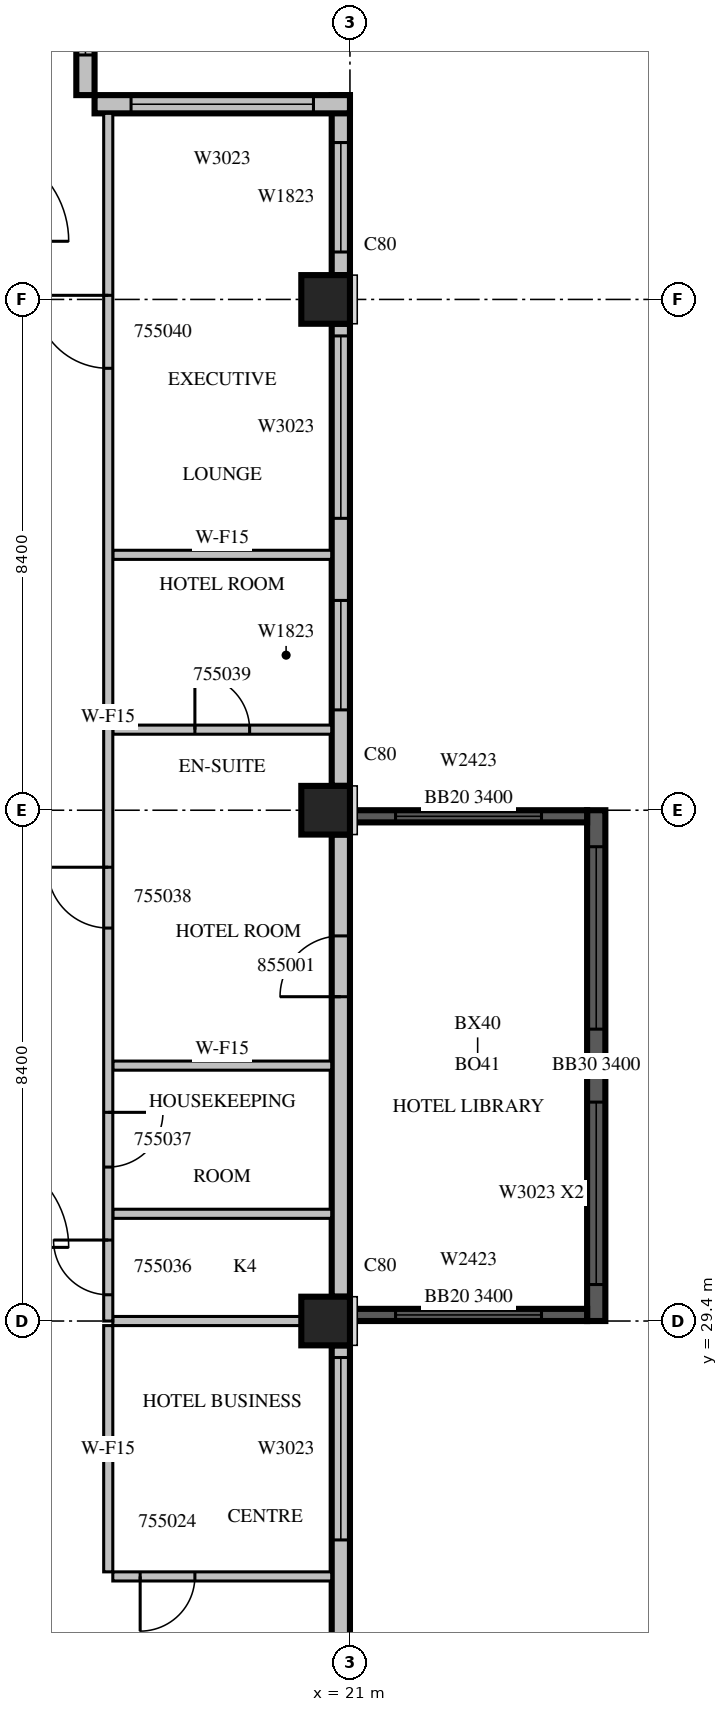
"""IFC4 building model, lengths in metres.
Left out: names, types, materials, properties, quantities, classifications, styles, units other than length and angle.
Written with IfcOpenShell. Run it as: python <this file> out.ifc"""

import sys

from ifc_helpers import new_model, si_unit, direction, frame, frame_2d, origin, origin_2d, place, context, subcontext, project, spatial, rectangle, extrude, source, transform, mapped, element, fill, save


model = new_model("IFC4")
c1 = context("Model", 3, precision=1e-05, world=origin(), true_north=direction((0.0, 1.0)))
c2 = subcontext(c1, "Body", "Model", "MODEL_VIEW")
j1 = project(units=[si_unit("LENGTHUNIT", "METRE"), si_unit("PLANEANGLEUNIT", "RADIAN")], contexts=[c1])
p1 = place(None, origin())
s1 = spatial("IfcSite", under=j1, at=p1, CompositionType="ELEMENT")
p2 = place(p1, origin())
s2 = spatial("IfcBuilding", under=s1, at=p2, CompositionType="ELEMENT")
p3 = place(p2, frame((0.0, 0.0, 242.4)))
s3 = spatial("IfcBuildingStorey", under=s2, at=p3, CompositionType="ELEMENT", Elevation=242.4)
m1 = source(origin(), c2, "Body", "SweptSolid", [
    extrude(rectangle(XDim=0.8, YDim=0.8, at=origin_2d()), origin(), (0.0, 0.0, 1.0), 3.8),
])
for number, where, z_axis, x_axis in (
    (1, (20.6, 29.4, 0.0), (0.0, 0.0, 1.0), (1.0, 0.0, 0.0)),
    (2, (20.6, 37.8, 0.0), (0.0, 0.0, 1.0), (1.0, 0.0, 0.0)),
    (3, (20.6, 46.2, 0.0), (0.0, 0.0, 1.0), (1.0, 0.0, 0.0)),
):
    element("IfcColumn", number, at=place(p3, frame(where, z_axis=z_axis, x_axis=x_axis)), inside=s3, PredefinedType="COLUMN", context=c2, shape_type="MappedRepresentation", body=[
        mapped(m1, transform((0.0, 0.0, 0.0), scale=1.0)),
    ])
m2 = source(origin(), c2, "Body", "SweptSolid", [
    extrude(rectangle(XDim=8.4, YDim=0.3, at=frame_2d((4.2, 0.0))), origin(), (0.0, 0.0, 1.0), 3.4),
])
p4 = place(p3, frame((25.05, 29.4, 0.0), z_axis=(0.0, 0.0, 1.0), x_axis=(0.0, 1.0, 0.0)))
e4 = element("IfcWall", 4, at=p4, inside=s3, PredefinedType="SOLIDWALL", context=c2, shape_type="MappedRepresentation", body=[
    mapped(m2, transform((0.0, 0.0, 0.0), scale=1.0)),
])
m3 = source(origin(), c2, "Body", "SweptSolid", [
    extrude(rectangle(XDim=3.0, YDim=2.3, at=frame_2d((1.5, 1.15))), frame((0.0, 0.16, 0.0), z_axis=(0.0, -1.0, 0.0), x_axis=(1.0, 0.0, 0.0)), (0.0, 0.0, 1.0), 0.32),
])
p5 = place(p4, frame((0.6, 0.0, 0.6)))
e5 = element("IfcOpeningElement", 5, at=p5, cuts=e4, PredefinedType="OPENING", context=c2, shape_type="MappedRepresentation", body=[
    mapped(m3, transform((0.0, 0.0, 0.0), scale=1.0)),
])
p6 = place(p4, frame((4.8, 0.0, 0.6)))
e6 = element("IfcOpeningElement", 6, at=p6, cuts=e4, PredefinedType="OPENING", context=c2, shape_type="MappedRepresentation", body=[
    mapped(m3, transform((0.0, 0.0, 0.0), scale=1.0)),
])
m4 = source(origin(), c2, "Body", "SweptSolid", [
    extrude(rectangle(XDim=3.9, YDim=0.2, at=frame_2d((1.95, 0.0))), origin(), (0.0, 0.0, 1.0), 3.4),
])
p7 = place(p3, frame((21.0, 29.5, 0.0), z_axis=(0.0, 0.0, 1.0), x_axis=(1.0, 0.0, 0.0)))
e7 = element("IfcWall", 7, at=p7, inside=s3, PredefinedType="SOLIDWALL", context=c2, shape_type="MappedRepresentation", body=[
    mapped(m4, transform((0.0, 0.0, 0.0), scale=1.0)),
])
m5 = source(origin(), c2, "Body", "SweptSolid", [
    extrude(rectangle(XDim=2.4, YDim=2.3, at=frame_2d((1.2, 1.15))), frame((0.0, 0.11, 0.0), z_axis=(0.0, -1.0, 0.0), x_axis=(1.0, 0.0, 0.0)), (0.0, 0.0, 1.0), 0.22),
])
p8 = place(p7, frame((0.75, 0.0, 0.6)))
e8 = element("IfcOpeningElement", 8, at=p8, cuts=e7, PredefinedType="OPENING", context=c2, shape_type="MappedRepresentation", body=[
    mapped(m5, transform((0.0, 0.0, 0.0), scale=1.0)),
])
p9 = place(p3, frame((21.0, 37.7, 0.0), z_axis=(0.0, 0.0, 1.0), x_axis=(1.0, 0.0, 0.0)))
e9 = element("IfcWall", 9, at=p9, inside=s3, PredefinedType="SOLIDWALL", context=c2, shape_type="MappedRepresentation", body=[
    mapped(m4, transform((0.0, 0.0, 0.0), scale=1.0)),
])
p10 = place(p9, frame((0.75, 0.0, 0.6)))
e10 = element("IfcOpeningElement", 10, at=p10, cuts=e9, PredefinedType="OPENING", context=c2, shape_type="MappedRepresentation", body=[
    mapped(m5, transform((0.0, 0.0, 0.0), scale=1.0)),
])
m6 = source(origin(), c2, "Body", "SweptSolid", [
    extrude(rectangle(XDim=7.2, YDim=0.3, at=frame_2d((3.6, 0.0))), origin(), (0.0, 0.0, 1.0), 3.4),
])
p11 = place(p3, frame((20.85, 21.8, 0.0), z_axis=(0.0, 0.0, 1.0), x_axis=(0.0, 1.0, 0.0)))
e11 = element("IfcWall", 11, at=p11, inside=s3, PredefinedType="STANDARD", context=c2, shape_type="MappedRepresentation", body=[
    mapped(m6, transform((0.0, 0.0, 0.0), scale=1.0)),
])
m7 = source(origin(), c2, "Body", "SweptSolid", [
    extrude(rectangle(XDim=1.8, YDim=2.3, at=frame_2d((0.9, 1.15))), frame((0.0, 0.16, 0.0), z_axis=(0.0, -1.0, 0.0), x_axis=(1.0, 0.0, 0.0)), (0.0, 0.0, 1.0), 0.32),
])
p12 = place(p11, frame((0.4, 0.0, 0.6)))
e12 = element("IfcOpeningElement", 12, at=p12, cuts=e11, PredefinedType="OPENING", context=c2, shape_type="MappedRepresentation", body=[
    mapped(m7, transform((0.0, 0.0, 0.0), scale=1.0)),
])
p13 = place(p11, frame((4.0, 0.0, 0.6)))
e13 = element("IfcOpeningElement", 13, at=p13, cuts=e11, PredefinedType="OPENING", context=c2, shape_type="MappedRepresentation", body=[
    mapped(m3, transform((0.0, 0.0, 0.0), scale=1.0)),
])
m8 = source(origin(), c2, "Body", "SweptSolid", [
    extrude(rectangle(XDim=7.6, YDim=0.3, at=frame_2d((3.8, 0.0))), origin(), (0.0, 0.0, 1.0), 3.4),
])
p14 = place(p3, frame((20.85, 29.8, 0.0), z_axis=(0.0, 0.0, 1.0), x_axis=(0.0, 1.0, 0.0)))
e14 = element("IfcWall", 14, at=p14, inside=s3, PredefinedType="STANDARD", context=c2, shape_type="MappedRepresentation", body=[
    mapped(m8, transform((0.0, 0.0, 0.0), scale=1.0)),
])
m9 = source(origin(), c2, "Body", "SweptSolid", [
    extrude(rectangle(XDim=1.0, YDim=2.1, at=frame_2d((0.5, 1.05))), frame((0.0, 0.16, 0.0), z_axis=(0.0, -1.0, 0.0), x_axis=(1.0, 0.0, 0.0)), (0.0, 0.0, 1.0), 0.32),
])
p15 = place(p14, frame((4.933, 0.0, 0.0)))
e15 = element("IfcOpeningElement", 15, at=p15, cuts=e14, PredefinedType="OPENING", context=c2, shape_type="MappedRepresentation", body=[
    mapped(m9, transform((0.0, 0.0, 0.0), scale=1.0)),
])
p16 = place(p3, frame((20.85, 38.2, 0.0), z_axis=(0.0, 0.0, 1.0), x_axis=(0.0, 1.0, 0.0)))
e16 = element("IfcWall", 16, at=p16, inside=s3, PredefinedType="STANDARD", context=c2, shape_type="MappedRepresentation", body=[
    mapped(m8, transform((0.0, 0.0, 0.0), scale=1.0)),
])
p17 = place(p16, frame((1.25, 0.0, 0.6)))
e17 = element("IfcOpeningElement", 17, at=p17, cuts=e16, PredefinedType="OPENING", context=c2, shape_type="MappedRepresentation", body=[
    mapped(m7, transform((0.0, 0.0, 0.0), scale=1.0)),
])
p18 = place(p16, frame((4.4, 0.0, 0.6)))
e18 = element("IfcOpeningElement", 18, at=p18, cuts=e16, PredefinedType="OPENING", context=c2, shape_type="MappedRepresentation", body=[
    mapped(m3, transform((0.0, 0.0, 0.0), scale=1.0)),
])
m10 = source(origin(), c2, "Body", "SweptSolid", [
    extrude(rectangle(XDim=2.96, YDim=0.3, at=frame_2d((1.48, 0.0))), origin(), (0.0, 0.0, 1.0), 3.4),
])
p19 = place(p3, frame((20.85, 46.6, 0.0), z_axis=(0.0, 0.0, 1.0), x_axis=(0.0, 1.0, 0.0)))
e19 = element("IfcWall", 19, at=p19, inside=s3, PredefinedType="STANDARD", context=c2, shape_type="MappedRepresentation", body=[
    mapped(m10, transform((0.0, 0.0, 0.0), scale=1.0)),
])
p20 = place(p19, frame((0.38, 0.0, 0.6)))
e20 = element("IfcOpeningElement", 20, at=p20, cuts=e19, PredefinedType="OPENING", context=c2, shape_type="MappedRepresentation", body=[
    mapped(m7, transform((0.0, 0.0, 0.0), scale=1.0)),
])
m11 = source(origin(), c2, "Body", "SweptSolid", [
    extrude(rectangle(XDim=4.2, YDim=0.3, at=frame_2d((2.1, 0.0))), origin(), (0.0, 0.0, 1.0), 3.4),
])
p21 = place(p3, frame((21.0, 49.41, 0.0), z_axis=(0.0, 0.0, 1.0), x_axis=(-1.0, 0.0, 0.0)))
e21 = element("IfcWall", 21, at=p21, inside=s3, PredefinedType="STANDARD", context=c2, shape_type="MappedRepresentation", body=[
    mapped(m11, transform((0.0, 0.0, 0.0), scale=1.0)),
])
p22 = place(p21, frame((0.6, 0.0, 0.6)))
e22 = element("IfcOpeningElement", 22, at=p22, cuts=e21, PredefinedType="OPENING", context=c2, shape_type="MappedRepresentation", body=[
    mapped(m3, transform((0.0, 0.0, 0.0), scale=1.0)),
])
m12 = source(origin(), c2, "Body", "SweptSolid", [
    extrude(rectangle(XDim=2.52, YDim=0.3, at=frame_2d((1.26, 0.0))), origin(), (0.0, 0.0, 1.0), 3.4),
])
p23 = place(p3, frame((16.65, 49.56, 0.0), z_axis=(0.0, 0.0, 1.0), x_axis=(0.0, 1.0, 0.0)))
e23 = element("IfcWall", 23, at=p23, inside=s3, PredefinedType="STANDARD", context=c2, shape_type="MappedRepresentation", body=[
    mapped(m12, transform((0.0, 0.0, 0.0), scale=1.0)),
])
m13 = source(origin(), c2, "Body", "SweptSolid", [
    extrude(rectangle(XDim=1.2, YDim=2.3, at=frame_2d((0.6, 1.15))), frame((0.0, 0.16, 0.0), z_axis=(0.0, -1.0, 0.0), x_axis=(1.0, 0.0, 0.0)), (0.0, 0.0, 1.0), 0.32),
])
p24 = place(p23, frame((0.66, 0.0, 0.6)))
e24 = element("IfcOpeningElement", 24, at=p24, cuts=e23, PredefinedType="OPENING", context=c2, shape_type="MappedRepresentation", body=[
    mapped(m13, transform((0.0, 0.0, 0.0), scale=1.0)),
])
m14 = source(origin(), c2, "Body", "SweptSolid", [
    extrude(rectangle(XDim=3.6, YDim=0.15, at=frame_2d((1.8, 0.0))), origin(), (0.0, 0.0, 1.0), 3.4),
])
p25 = place(p3, frame((17.1, 25.2, 0.0), z_axis=(0.0, 0.0, 1.0), x_axis=(1.0, 0.0, 0.0)))
e25 = element("IfcWall", 25, at=p25, inside=s3, PredefinedType="PARTITIONING", context=c2, shape_type="MappedRepresentation", body=[
    mapped(m14, transform((0.0, 0.0, 0.0), scale=1.0)),
])
m15 = source(origin(), c2, "Body", "SweptSolid", [
    extrude(rectangle(XDim=0.9, YDim=2.1, at=frame_2d((0.45, 1.05))), frame((0.0, 0.085, 0.0), z_axis=(0.0, -1.0, 0.0), x_axis=(1.0, 0.0, 0.0)), (0.0, 0.0, 1.0), 0.17),
])
p26 = place(p25, frame((0.45, 0.0, 0.0)))
e26 = element("IfcOpeningElement", 26, at=p26, cuts=e25, PredefinedType="OPENING", context=c2, shape_type="MappedRepresentation", body=[
    mapped(m15, transform((0.0, 0.0, 0.0), scale=1.0)),
])
m16 = source(origin(), c2, "Body", "SweptSolid", [
    extrude(rectangle(XDim=4.05, YDim=0.15, at=frame_2d((2.025, 0.0))), origin(), (0.0, 0.0, 1.0), 3.4),
])
p27 = place(p3, frame((17.025, 29.325, 0.0), z_axis=(0.0, 0.0, 1.0), x_axis=(0.0, -1.0, 0.0)))
e27 = element("IfcWall", 27, at=p27, inside=s3, PredefinedType="PARTITIONING", context=c2, shape_type="MappedRepresentation", body=[
    mapped(m16, transform((0.0, 0.0, 0.0), scale=1.0)),
])
m17 = source(origin(), c2, "Body", "SweptSolid", [
    extrude(rectangle(XDim=3.101, YDim=0.15, at=frame_2d((1.55, 0.0))), origin(), (0.0, 0.0, 1.0), 3.4),
])
p28 = place(p3, frame((20.201, 29.4, 0.0), z_axis=(0.0, 0.0, 1.0), x_axis=(-1.0, 0.0, 0.0)))
e28 = element("IfcWall", 28, at=p28, inside=s3, PredefinedType="PARTITIONING", context=c2, shape_type="MappedRepresentation", body=[
    mapped(m17, transform((0.0, 0.0, 0.0), scale=1.0)),
])
p29 = place(p3, frame((17.1, 31.163, 0.0), z_axis=(0.0, 0.0, 1.0), x_axis=(1.0, 0.0, 0.0)))
e29 = element("IfcWall", 29, at=p29, inside=s3, PredefinedType="PARTITIONING", context=c2, shape_type="MappedRepresentation", body=[
    mapped(m14, transform((0.0, 0.0, 0.0), scale=1.0)),
])
p30 = place(p3, frame((17.1, 39.125, 0.0), z_axis=(0.0, 0.0, 1.0), x_axis=(1.0, 0.0, 0.0)))
e30 = element("IfcWall", 30, at=p30, inside=s3, PredefinedType="PARTITIONING", context=c2, shape_type="MappedRepresentation", body=[
    mapped(m14, transform((0.0, 0.0, 0.0), scale=1.0)),
])
p31 = place(p30, frame((1.35, 0.0, 0.0)))
e31 = element("IfcOpeningElement", 31, at=p31, cuts=e30, PredefinedType="OPENING", context=c2, shape_type="MappedRepresentation", body=[
    mapped(m15, transform((0.0, 0.0, 0.0), scale=1.0)),
])
for number, where, z_axis, x_axis in (
    (32, (20.7, 33.6, 0.0), (0.0, 0.0, 1.0), (-1.0, 0.0, 0.0)),
    (33, (20.7, 42.0, 0.0), (0.0, 0.0, 1.0), (-1.0, 0.0, 0.0)),
):
    element("IfcWall", number, at=place(p3, frame(where, z_axis=z_axis, x_axis=x_axis)), inside=s3, PredefinedType="PARTITIONING", context=c2, shape_type="MappedRepresentation", body=[
        mapped(m14, transform((0.0, 0.0, 0.0), scale=1.0)),
    ])
m18 = source(origin(), c2, "Body", "SweptSolid", [
    extrude(rectangle(XDim=19.86, YDim=0.15, at=frame_2d((9.93, 0.0))), origin(), (0.0, 0.0, 1.0), 3.4),
])
p32 = place(p3, frame((17.025, 49.26, 0.0), z_axis=(0.0, 0.0, 1.0), x_axis=(0.0, -1.0, 0.0)))
e34 = element("IfcWall", 34, at=p32, inside=s3, PredefinedType="PARTITIONING", context=c2, shape_type="MappedRepresentation", body=[
    mapped(m18, transform((0.0, 0.0, 0.0), scale=1.0)),
])
p33 = place(p32, frame((18.528, 0.0, 0.0)))
e35 = element("IfcOpeningElement", 35, at=p33, cuts=e34, PredefinedType="OPENING", context=c2, shape_type="MappedRepresentation", body=[
    mapped(m15, transform((0.0, 0.0, 0.0), scale=1.0)),
])
p34 = place(p32, frame((16.428, 0.0, 0.0)))
e36 = element("IfcOpeningElement", 36, at=p34, cuts=e34, PredefinedType="OPENING", context=c2, shape_type="MappedRepresentation", body=[
    mapped(m15, transform((0.0, 0.0, 0.0), scale=1.0)),
])
m19 = source(origin(), c2, "Body", "SweptSolid", [
    extrude(rectangle(XDim=1.0, YDim=2.1, at=frame_2d((0.5, 1.05))), frame((0.0, 0.085, 0.0), z_axis=(0.0, -1.0, 0.0), x_axis=(1.0, 0.0, 0.0)), (0.0, 0.0, 1.0), 0.17),
])
p35 = place(p32, frame((12.398, 0.0, 0.0)))
e37 = element("IfcOpeningElement", 37, at=p35, cuts=e34, PredefinedType="OPENING", context=c2, shape_type="MappedRepresentation", body=[
    mapped(m19, transform((0.0, 0.0, 0.0), scale=1.0)),
])
m20 = source(origin(), c2, "Body", "SweptSolid", [
    extrude(rectangle(XDim=1.2, YDim=2.1, at=frame_2d((0.6, 1.05))), frame((0.0, 0.085, 0.0), z_axis=(0.0, -1.0, 0.0), x_axis=(1.0, 0.0, 0.0)), (0.0, 0.0, 1.0), 0.17),
])
p36 = place(p32, frame((2.993, 0.0, 0.0)))
e38 = element("IfcOpeningElement", 38, at=p36, cuts=e34, PredefinedType="OPENING", context=c2, shape_type="MappedRepresentation", body=[
    mapped(m20, transform((0.0, 0.0, 0.0), scale=1.0)),
])
m21 = source(origin(), c2, "Body", "SweptSolid", [
    extrude(rectangle(XDim=3.0, YDim=2.3, at=frame_2d((1.5, 1.15))), frame((0.0, 0.03, 0.0), z_axis=(0.0, -1.0, 0.0), x_axis=(1.0, 0.0, 0.0)), (0.0, 0.0, 1.0), 0.06),
])
p37 = place(p5, origin())
e39 = element("IfcWindow", 39, at=p37, inside=s3, PartitioningType="SINGLE_PANEL", PredefinedType="WINDOW", context=c2, shape_type="MappedRepresentation", body=[
    mapped(m21, transform((0.0, 0.0, 0.0), scale=1.0)),
])
fill(e5, e39)
p38 = place(p6, origin())
e40 = element("IfcWindow", 40, at=p38, inside=s3, PartitioningType="SINGLE_PANEL", PredefinedType="WINDOW", context=c2, shape_type="MappedRepresentation", body=[
    mapped(m21, transform((0.0, 0.0, 0.0), scale=1.0)),
])
fill(e6, e40)
m22 = source(origin(), c2, "Body", "SweptSolid", [
    extrude(rectangle(XDim=2.4, YDim=2.3, at=frame_2d((1.2, 1.15))), frame((0.0, 0.03, 0.0), z_axis=(0.0, -1.0, 0.0), x_axis=(1.0, 0.0, 0.0)), (0.0, 0.0, 1.0), 0.06),
])
p39 = place(p8, origin())
e41 = element("IfcWindow", 41, at=p39, inside=s3, PartitioningType="SINGLE_PANEL", PredefinedType="WINDOW", context=c2, shape_type="MappedRepresentation", body=[
    mapped(m22, transform((0.0, 0.0, 0.0), scale=1.0)),
])
fill(e8, e41)
p40 = place(p10, origin())
e42 = element("IfcWindow", 42, at=p40, inside=s3, PartitioningType="SINGLE_PANEL", PredefinedType="WINDOW", context=c2, shape_type="MappedRepresentation", body=[
    mapped(m22, transform((0.0, 0.0, 0.0), scale=1.0)),
])
fill(e10, e42)
p41 = place(p13, origin())
e43 = element("IfcWindow", 43, at=p41, inside=s3, PartitioningType="SINGLE_PANEL", PredefinedType="WINDOW", context=c2, shape_type="MappedRepresentation", body=[
    mapped(m21, transform((0.0, 0.0, 0.0), scale=1.0)),
])
fill(e13, e43)
m23 = source(origin(), c2, "Body", "SweptSolid", [
    extrude(rectangle(XDim=1.8, YDim=2.3, at=frame_2d((0.9, 1.15))), frame((0.0, 0.03, 0.0), z_axis=(0.0, -1.0, 0.0), x_axis=(1.0, 0.0, 0.0)), (0.0, 0.0, 1.0), 0.06),
])
p42 = place(p17, origin())
e44 = element("IfcWindow", 44, at=p42, inside=s3, PartitioningType="SINGLE_PANEL", PredefinedType="WINDOW", context=c2, shape_type="MappedRepresentation", body=[
    mapped(m23, transform((0.0, 0.0, 0.0), scale=1.0)),
])
fill(e17, e44)
p43 = place(p18, origin())
e45 = element("IfcWindow", 45, at=p43, inside=s3, PartitioningType="SINGLE_PANEL", PredefinedType="WINDOW", context=c2, shape_type="MappedRepresentation", body=[
    mapped(m21, transform((0.0, 0.0, 0.0), scale=1.0)),
])
fill(e18, e45)
p44 = place(p20, origin())
e46 = element("IfcWindow", 46, at=p44, inside=s3, PartitioningType="SINGLE_PANEL", PredefinedType="WINDOW", context=c2, shape_type="MappedRepresentation", body=[
    mapped(m23, transform((0.0, 0.0, 0.0), scale=1.0)),
])
fill(e20, e46)
p45 = place(p22, origin())
e47 = element("IfcWindow", 47, at=p45, inside=s3, PartitioningType="SINGLE_PANEL", PredefinedType="WINDOW", context=c2, shape_type="MappedRepresentation", body=[
    mapped(m21, transform((0.0, 0.0, 0.0), scale=1.0)),
])
fill(e22, e47)
m24 = source(origin(), c2, "Body", "SweptSolid", [
    extrude(rectangle(XDim=1.2, YDim=2.3, at=frame_2d((0.6, 1.15))), frame((0.0, 0.03, 0.0), z_axis=(0.0, -1.0, 0.0), x_axis=(1.0, 0.0, 0.0)), (0.0, 0.0, 1.0), 0.06),
])
p46 = place(p24, origin())
e48 = element("IfcWindow", 48, at=p46, inside=s3, PartitioningType="SINGLE_PANEL", PredefinedType="WINDOW", context=c2, shape_type="MappedRepresentation", body=[
    mapped(m24, transform((0.0, 0.0, 0.0), scale=1.0)),
])
fill(e24, e48)
m25 = source(origin(), c2, "Body", "SweptSolid", [
    extrude(rectangle(XDim=0.9, YDim=2.1, at=frame_2d((0.45, 1.05))), frame((0.0, 0.025, 0.0), z_axis=(0.0, -1.0, 0.0), x_axis=(1.0, 0.0, 0.0)), (0.0, 0.0, 1.0), 0.05),
])
p47 = place(p26, origin())
e49 = element("IfcDoor", 49, at=p47, inside=s3, OperationType="SINGLE_SWING_RIGHT", PredefinedType="DOOR", context=c2, shape_type="MappedRepresentation", body=[
    mapped(m25, transform((0.0, 0.0, 0.0), scale=1.0)),
])
fill(e26, e49)
p48 = place(p33, origin())
e50 = element("IfcDoor", 50, at=p48, inside=s3, OperationType="SINGLE_SWING_RIGHT", PredefinedType="DOOR", context=c2, shape_type="MappedRepresentation", body=[
    mapped(m25, transform((0.0, 0.0, 0.0), scale=1.0)),
])
fill(e35, e50)
p49 = place(p34, origin())
e51 = element("IfcDoor", 51, at=p49, inside=s3, OperationType="SINGLE_SWING_LEFT", PredefinedType="DOOR", context=c2, shape_type="MappedRepresentation", body=[
    mapped(m25, transform((0.0, 0.0, 0.0), scale=1.0)),
])
fill(e36, e51)
m26 = source(origin(), c2, "Body", "SweptSolid", [
    extrude(rectangle(XDim=1.0, YDim=2.1, at=frame_2d((0.5, 1.05))), frame((0.0, 0.025, 0.0), z_axis=(0.0, -1.0, 0.0), x_axis=(1.0, 0.0, 0.0)), (0.0, 0.0, 1.0), 0.05),
])
p50 = place(p35, origin())
e52 = element("IfcDoor", 52, at=p50, inside=s3, OperationType="SINGLE_SWING_RIGHT", PredefinedType="DOOR", context=c2, shape_type="MappedRepresentation", body=[
    mapped(m26, transform((0.0, 0.0, 0.0), scale=1.0)),
])
fill(e37, e52)
p51 = place(p31, origin())
e53 = element("IfcDoor", 53, at=p51, inside=s3, OperationType="SINGLE_SWING_LEFT", PredefinedType="DOOR", context=c2, shape_type="MappedRepresentation", body=[
    mapped(m25, transform((0.0, 0.0, 0.0), scale=1.0)),
])
fill(e31, e53)
m27 = source(origin(), c2, "Body", "SweptSolid", [
    extrude(rectangle(XDim=1.2, YDim=2.1, at=frame_2d((0.6, 1.05))), frame((0.0, 0.025, 0.0), z_axis=(0.0, -1.0, 0.0), x_axis=(1.0, 0.0, 0.0)), (0.0, 0.0, 1.0), 0.05),
])
p52 = place(p36, origin())
e54 = element("IfcDoor", 54, at=p52, inside=s3, OperationType="SINGLE_SWING_RIGHT", PredefinedType="DOOR", context=c2, shape_type="MappedRepresentation", body=[
    mapped(m27, transform((0.0, 0.0, 0.0), scale=1.0)),
])
fill(e38, e54)
p53 = place(p15, origin())
e55 = element("IfcDoor", 55, at=p53, inside=s3, OperationType="SINGLE_SWING_LEFT", PredefinedType="DOOR", context=c2, shape_type="MappedRepresentation", body=[
    mapped(m26, transform((0.0, 0.0, 0.0), scale=1.0)),
])
fill(e15, e55)
save(model, sys.argv[1])
